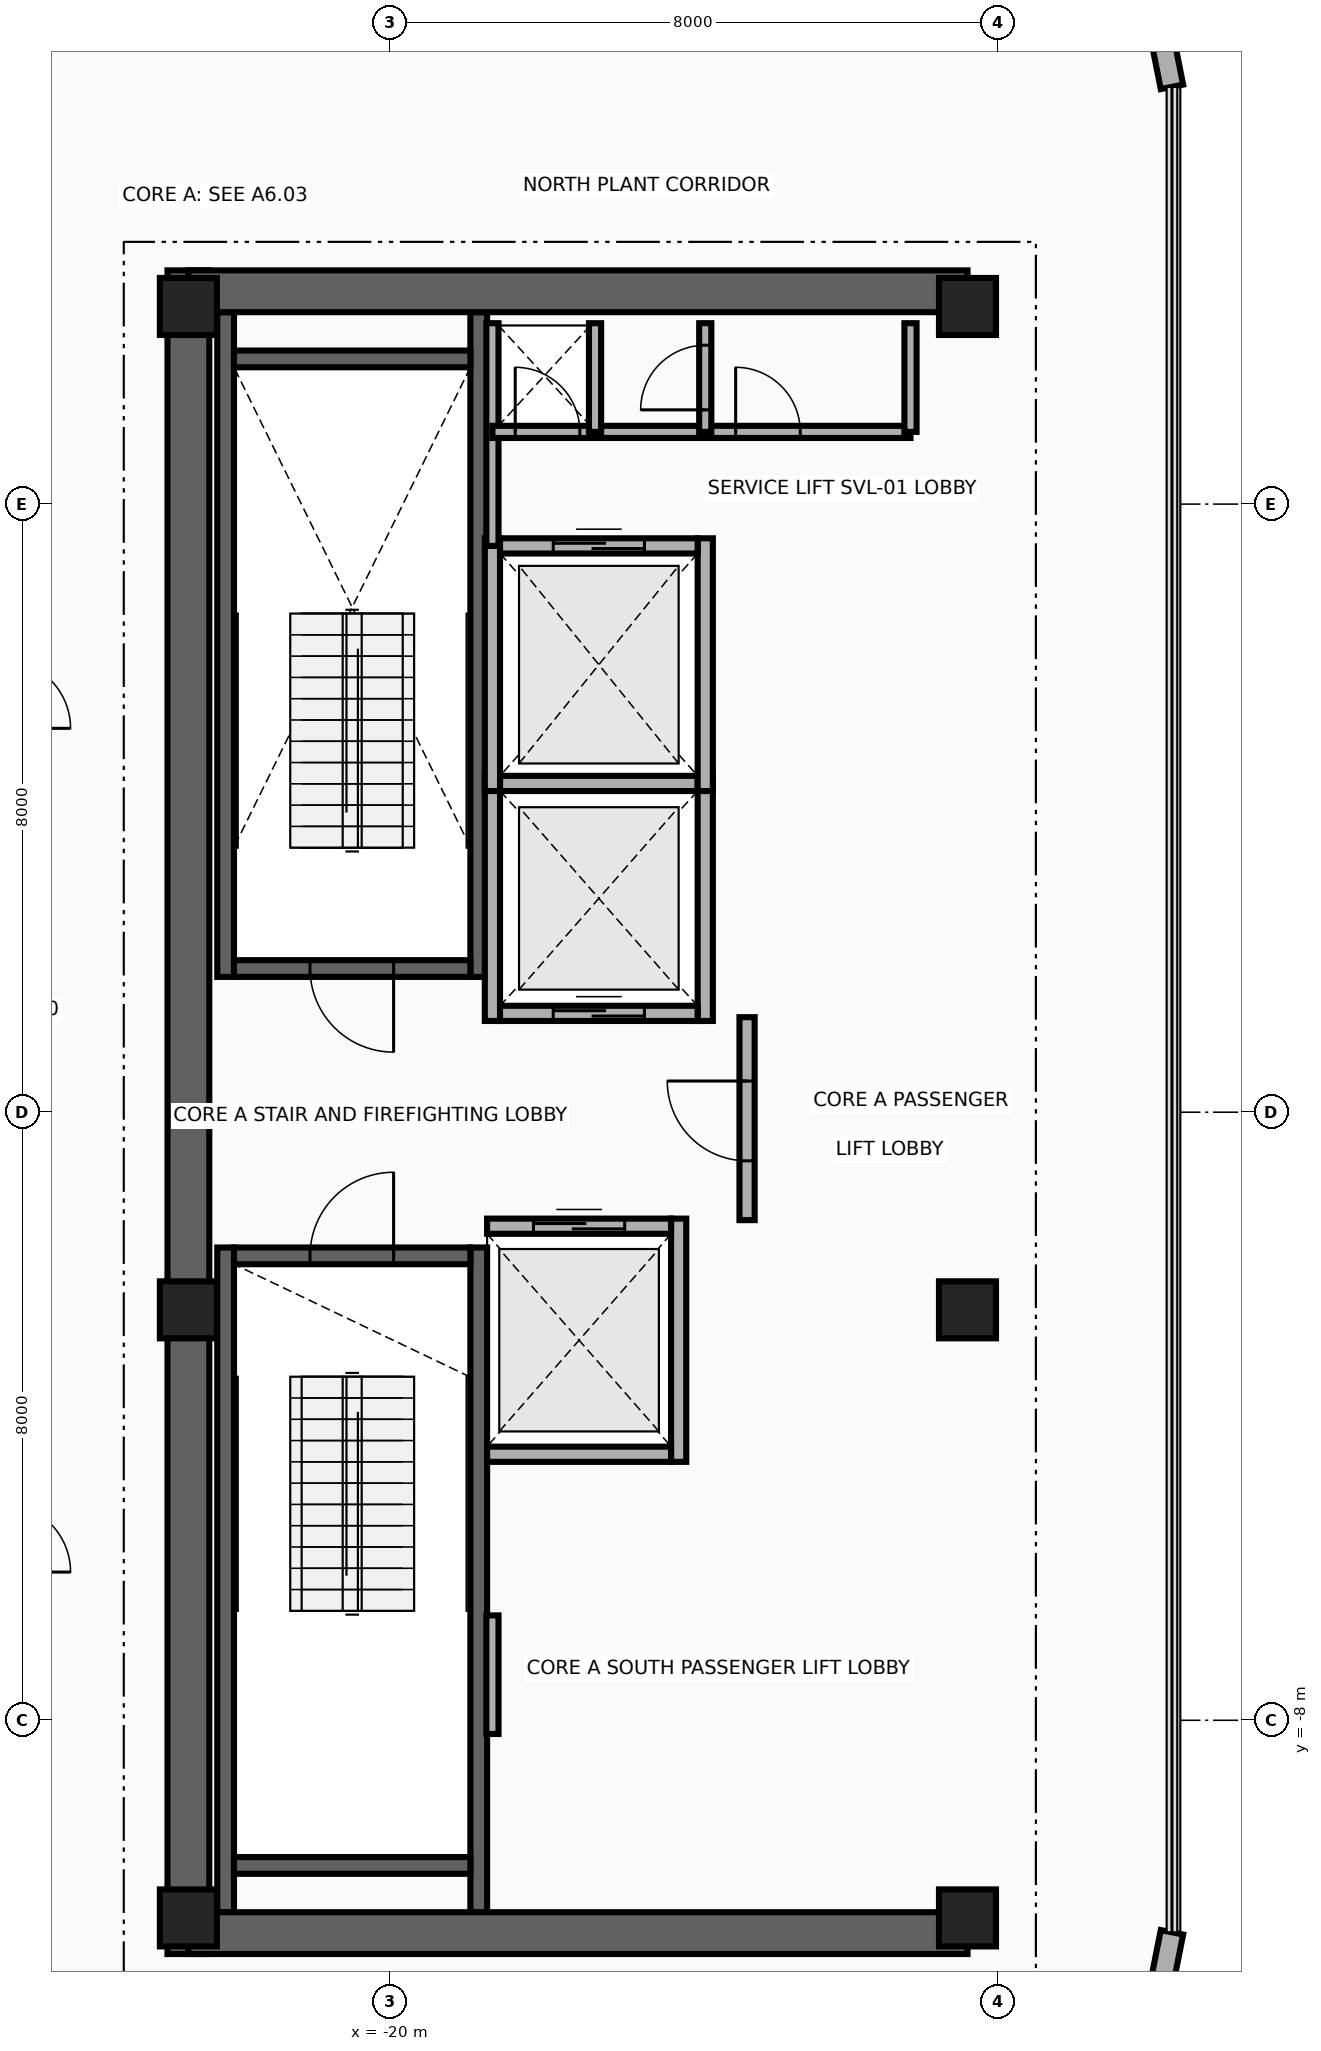
"""IFC4 building model, lengths in metres.
Left out: names, types, materials, properties, quantities, classifications, styles, units other than length and angle.
Written with IfcOpenShell. Run it as: python <this file> out.ifc"""

import sys

from ifc_helpers import new_model, si_unit, direction, frame, frame_2d, origin, origin_2d, place, context, subcontext, project, spatial, rectangle, extrude, source, transform, mapped, element, fill, save


model = new_model("IFC4")
c1 = context("Model", 3, precision=1e-05, world=origin(), true_north=direction((0.0, 1.0)))
c2 = subcontext(c1, "Body", "Model", "MODEL_VIEW")
j1 = project(units=[si_unit("LENGTHUNIT", "METRE"), si_unit("PLANEANGLEUNIT", "RADIAN")], contexts=[c1])
p1 = place(None, origin())
s1 = spatial("IfcSite", under=j1, at=p1, CompositionType="ELEMENT")
p2 = place(p1, origin())
s2 = spatial("IfcBuilding", under=s1, at=p2, CompositionType="ELEMENT")
p3 = place(p2, frame((0.0, 0.0, 299.4)))
s3 = spatial("IfcBuildingStorey", under=s2, at=p3, CompositionType="ELEMENT", Elevation=299.4)
for number, where, z_axis, x_axis in (
    (1, (-22.16, 1.78, 0.0), (0.0, 0.0, 1.0), (0.0, 1.0, 0.0)),
    (2, (-18.83, 1.78, 0.0), (0.0, 0.0, 1.0), (0.0, 1.0, 0.0)),
):
    element("IfcWall", number, at=place(p3, frame(where, z_axis=z_axis, x_axis=x_axis)), inside=s3, PredefinedType="SHEAR", context=c2, shape_type="SweptSolid", body=[
        extrude(rectangle(XDim=8.745, YDim=0.22, at=frame_2d((4.373, 0.0))), origin(), (0.0, 0.0, 1.0), 3.96),
    ])
p4 = place(p3, frame((-22.05, 1.89, 0.0), z_axis=(0.0, 0.0, 1.0), x_axis=(1.0, 0.0, 0.0)))
e3 = element("IfcWall", 3, at=p4, inside=s3, PredefinedType="SHEAR", context=c2, shape_type="SweptSolid", body=[
    extrude(rectangle(XDim=3.11, YDim=0.22, at=frame_2d((1.555, 0.0))), origin(), (0.0, 0.0, 1.0), 3.96),
])
p5 = place(p4, frame((1.0, 0.0, 0.0)))
e4 = element("IfcOpeningElement", 4, at=p5, cuts=e3, PredefinedType="OPENING", context=c2, shape_type="SweptSolid", body=[
    extrude(rectangle(XDim=1.1, YDim=2.15, at=frame_2d((0.55, 1.075))), frame((0.0, 0.125, 0.0), z_axis=(0.0, -1.0, 0.0), x_axis=(1.0, 0.0, 0.0)), (0.0, 0.0, 1.0), 0.25),
])
p6 = place(p3, frame((-22.05, 9.91, 0.0), z_axis=(0.0, 0.0, 1.0), x_axis=(1.0, 0.0, 0.0)))
e5 = element("IfcWall", 5, at=p6, inside=s3, PredefinedType="SHEAR", context=c2, shape_type="SweptSolid", body=[
    extrude(rectangle(XDim=3.11, YDim=0.22, at=frame_2d((1.555, 0.0))), origin(), (0.0, 0.0, 1.0), 3.96),
])
for number, where, z_axis, x_axis in (
    (6, (-22.16, -10.525, 0.0), (0.0, 0.0, 1.0), (0.0, 1.0, 0.0)),
    (7, (-18.83, -10.525, 0.0), (0.0, 0.0, 1.0), (0.0, 1.0, 0.0)),
):
    element("IfcWall", number, at=place(p3, frame(where, z_axis=z_axis, x_axis=x_axis)), inside=s3, PredefinedType="SHEAR", context=c2, shape_type="SweptSolid", body=[
        extrude(rectangle(XDim=8.745, YDim=0.22, at=frame_2d((4.373, 0.0))), origin(), (0.0, 0.0, 1.0), 3.96),
    ])
p7 = place(p3, frame((-22.05, -9.91, 0.0), z_axis=(0.0, 0.0, 1.0), x_axis=(1.0, 0.0, 0.0)))
e8 = element("IfcWall", 8, at=p7, inside=s3, PredefinedType="SHEAR", context=c2, shape_type="SweptSolid", body=[
    extrude(rectangle(XDim=3.11, YDim=0.22, at=frame_2d((1.555, 0.0))), origin(), (0.0, 0.0, 1.0), 3.96),
])
p8 = place(p3, frame((-22.05, -1.89, 0.0), z_axis=(0.0, 0.0, 1.0), x_axis=(1.0, 0.0, 0.0)))
e9 = element("IfcWall", 9, at=p8, inside=s3, PredefinedType="SHEAR", context=c2, shape_type="SweptSolid", body=[
    extrude(rectangle(XDim=3.11, YDim=0.22, at=frame_2d((1.555, 0.0))), origin(), (0.0, 0.0, 1.0), 3.96),
])
p9 = place(p8, frame((1.0, 0.0, 0.0)))
e10 = element("IfcOpeningElement", 10, at=p9, cuts=e9, PredefinedType="OPENING", context=c2, shape_type="SweptSolid", body=[
    extrude(rectangle(XDim=1.1, YDim=2.15, at=frame_2d((0.55, 1.075))), frame((0.0, 0.125, 0.0), z_axis=(0.0, -1.0, 0.0), x_axis=(1.0, 0.0, 0.0)), (0.0, 0.0, 1.0), 0.25),
])
p10 = place(p3, frame((-22.65, -11.075, 0.0), z_axis=(0.0, 0.0, 1.0), x_axis=(0.0, 1.0, 0.0)))
e11 = element("IfcWall", 11, at=p10, inside=s3, PredefinedType="SHEAR", context=c2, shape_type="SweptSolid", body=[
    extrude(rectangle(XDim=22.15, YDim=0.55, at=frame_2d((11.075, 0.0))), origin(), (0.0, 0.0, 1.0), 3.96),
])
for number, where, z_axis, x_axis in (
    (12, (-22.65, 10.8, 0.0), (0.0, 0.0, 1.0), (1.0, 0.0, 0.0)),
    (13, (-22.65, -10.8, 0.0), (0.0, 0.0, 1.0), (1.0, 0.0, 0.0)),
):
    element("IfcWall", number, at=place(p3, frame(where, z_axis=z_axis, x_axis=x_axis)), inside=s3, PredefinedType="SHEAR", context=c2, shape_type="SweptSolid", body=[
        extrude(rectangle(XDim=10.25, YDim=0.55, at=frame_2d((5.125, 0.0))), origin(), (0.0, 0.0, 1.0), 3.96),
    ])
m1 = source(origin(), c2, "Body", "SweptSolid", [
    extrude(rectangle(XDim=0.75, YDim=0.75, at=origin_2d()), origin(), (0.0, 0.0, 1.0), 4.2),
])
for number, where, z_axis, x_axis in (
    (14, (-22.65, -10.6, 0.0), (0.0, 0.0, 1.0), (1.0, 0.0, 0.0)),
    (15, (-12.4, -10.6, 0.0), (0.0, 0.0, 1.0), (1.0, 0.0, 0.0)),
    (16, (-22.65, -2.6, 0.0), (0.0, 0.0, 1.0), (1.0, 0.0, 0.0)),
    (17, (-12.4, -2.6, 0.0), (0.0, 0.0, 1.0), (1.0, 0.0, 0.0)),
    (18, (-22.65, 10.6, 0.0), (0.0, 0.0, 1.0), (1.0, 0.0, 0.0)),
    (19, (-12.4, 10.6, 0.0), (0.0, 0.0, 1.0), (1.0, 0.0, 0.0)),
):
    element("IfcColumn", number, at=place(p3, frame(where, z_axis=z_axis, x_axis=x_axis)), inside=s3, PredefinedType="COLUMN", context=c2, shape_type="MappedRepresentation", body=[
        mapped(m1, transform((0.0, 0.0, 0.0), x_axis=(1.0, 0.0, 0.0), y_axis=(0.0, 1.0, 0.0), z_axis=(0.0, 0.0, 1.0), scale=1.0)),
    ])
for number, where, z_axis, x_axis in (
    (20, (-9.932, 14.605, 0.0), (0.0, 0.0, 1.0), (0.195, -0.981, 0.0)),
    (21, (-9.71, -10.789, 0.0), (0.0, 0.0, 1.0), (-0.195, -0.981, 0.0)),
):
    element("IfcWall", number, at=place(p3, frame(where, z_axis=z_axis, x_axis=x_axis)), inside=s3, PredefinedType="SOLIDWALL", context=c2, shape_type="SweptSolid", body=[
        extrude(rectangle(XDim=1.138, YDim=0.3, at=frame_2d((0.569, 0.0))), origin(), (0.0, 0.0, 1.0), 3.96),
    ])
for number, where, z_axis, x_axis in (
    (22, (-18.65, 1.2, 0.0), (0.0, 0.0, 1.0), (0.0, 1.0, 0.0)),
    (23, (-15.85, 1.2, 0.0), (0.0, 0.0, 1.0), (0.0, 1.0, 0.0)),
):
    element("IfcWall", number, at=place(p3, frame(where, z_axis=z_axis, x_axis=x_axis)), inside=s3, PredefinedType="MOVABLE", context=c2, shape_type="SweptSolid", body=[
        extrude(rectangle(XDim=3.225, YDim=0.2, at=frame_2d((1.613, 0.0))), origin(), (0.0, 0.0, 1.0), 3.96),
    ])
p11 = place(p3, frame((-18.55, 1.3, 0.0), z_axis=(0.0, 0.0, 1.0), x_axis=(1.0, 0.0, 0.0)))
e24 = element("IfcWall", 24, at=p11, inside=s3, PredefinedType="MOVABLE", context=c2, shape_type="SweptSolid", body=[
    extrude(rectangle(XDim=2.6, YDim=0.2, at=frame_2d((1.3, 0.0))), origin(), (0.0, 0.0, 1.0), 3.96),
])
p12 = place(p11, frame((0.7, 0.0, 0.0)))
e25 = element("IfcOpeningElement", 25, at=p12, cuts=e24, PredefinedType="OPENING", context=c2, shape_type="SweptSolid", body=[
    extrude(rectangle(XDim=1.2, YDim=2.1, at=frame_2d((0.6, 1.05))), frame((0.0, 0.115, 0.0), z_axis=(0.0, -1.0, 0.0), x_axis=(1.0, 0.0, 0.0)), (0.0, 0.0, 1.0), 0.23),
])
p13 = place(p3, frame((-18.55, 4.325, 0.0), z_axis=(0.0, 0.0, 1.0), x_axis=(1.0, 0.0, 0.0)))
e26 = element("IfcWall", 26, at=p13, inside=s3, PredefinedType="MOVABLE", context=c2, shape_type="SweptSolid", body=[
    extrude(rectangle(XDim=2.6, YDim=0.2, at=frame_2d((1.3, 0.0))), origin(), (0.0, 0.0, 1.0), 3.96),
])
p14 = place(p3, frame((-16.2, -4.6, 0.0), z_axis=(0.0, 0.0, 1.0), x_axis=(0.0, 1.0, 0.0)))
e27 = element("IfcWall", 27, at=p14, inside=s3, PredefinedType="MOVABLE", context=c2, shape_type="SweptSolid", body=[
    extrude(rectangle(XDim=3.2, YDim=0.2, at=frame_2d((1.6, 0.0))), origin(), (0.0, 0.0, 1.0), 3.96),
])
p15 = place(p3, frame((-18.72, -4.5, 0.0), z_axis=(0.0, 0.0, 1.0), x_axis=(1.0, 0.0, 0.0)))
e28 = element("IfcWall", 28, at=p15, inside=s3, PredefinedType="MOVABLE", context=c2, shape_type="SweptSolid", body=[
    extrude(rectangle(XDim=2.42, YDim=0.2, at=frame_2d((1.21, 0.0))), origin(), (0.0, 0.0, 1.0), 3.96),
])
p16 = place(p3, frame((-18.72, -1.5, 0.0), z_axis=(0.0, 0.0, 1.0), x_axis=(1.0, 0.0, 0.0)))
e29 = element("IfcWall", 29, at=p16, inside=s3, PredefinedType="MOVABLE", context=c2, shape_type="SweptSolid", body=[
    extrude(rectangle(XDim=2.42, YDim=0.2, at=frame_2d((1.21, 0.0))), origin(), (0.0, 0.0, 1.0), 3.96),
])
p17 = place(p16, frame((0.61, 0.0, 0.0)))
e30 = element("IfcOpeningElement", 30, at=p17, cuts=e29, PredefinedType="OPENING", context=c2, shape_type="SweptSolid", body=[
    extrude(rectangle(XDim=1.2, YDim=2.1, at=frame_2d((0.6, 1.05))), frame((0.0, 0.115, 0.0), z_axis=(0.0, -1.0, 0.0), x_axis=(1.0, 0.0, 0.0)), (0.0, 0.0, 1.0), 0.23),
])
for number, where, z_axis, x_axis in (
    (31, (-18.65, 4.225, 0.0), (0.0, 0.0, 1.0), (0.0, 1.0, 0.0)),
    (32, (-15.85, 4.225, 0.0), (0.0, 0.0, 1.0), (0.0, 1.0, 0.0)),
):
    element("IfcWall", number, at=place(p3, frame(where, z_axis=z_axis, x_axis=x_axis)), inside=s3, PredefinedType="MOVABLE", context=c2, shape_type="SweptSolid", body=[
        extrude(rectangle(XDim=3.325, YDim=0.2, at=frame_2d((1.663, 0.0))), origin(), (0.0, 0.0, 1.0), 3.96),
    ])
p18 = place(p3, frame((-18.55, 7.45, 0.0), z_axis=(0.0, 0.0, 1.0), x_axis=(1.0, 0.0, 0.0)))
e33 = element("IfcWall", 33, at=p18, inside=s3, PredefinedType="MOVABLE", context=c2, shape_type="SweptSolid", body=[
    extrude(rectangle(XDim=2.6, YDim=0.2, at=frame_2d((1.3, 0.0))), origin(), (0.0, 0.0, 1.0), 3.96),
])
p19 = place(p18, frame((0.7, 0.0, 0.0)))
e34 = element("IfcOpeningElement", 34, at=p19, cuts=e33, PredefinedType="OPENING", context=c2, shape_type="SweptSolid", body=[
    extrude(rectangle(XDim=1.2, YDim=2.1, at=frame_2d((0.6, 1.05))), frame((0.0, 0.115, 0.0), z_axis=(0.0, -1.0, 0.0), x_axis=(1.0, 0.0, 0.0)), (0.0, 0.0, 1.0), 0.23),
])
p20 = place(p3, frame((-15.3, -1.42, 0.0), z_axis=(0.0, 0.0, 1.0), x_axis=(0.0, 1.0, 0.0)))
e35 = element("IfcWall", 35, at=p20, inside=s3, PredefinedType="PARTITIONING", context=c2, shape_type="SweptSolid", body=[
    extrude(rectangle(XDim=2.67, YDim=0.2, at=frame_2d((1.335, 0.0))), origin(), (0.0, 0.0, 1.0), 3.96),
])
p21 = place(p20, frame((0.78, 0.0, 0.0)))
e36 = element("IfcOpeningElement", 36, at=p21, cuts=e35, PredefinedType="OPENING", context=c2, shape_type="SweptSolid", body=[
    extrude(rectangle(XDim=1.05, YDim=2.15, at=frame_2d((0.525, 1.075))), frame((0.0, 0.115, 0.0), z_axis=(0.0, -1.0, 0.0), x_axis=(1.0, 0.0, 0.0)), (0.0, 0.0, 1.0), 0.23),
])
p22 = place(p3, frame((-18.65, 7.45, 0.0), z_axis=(0.0, 0.0, 1.0), x_axis=(0.0, 1.0, 0.0)))
e37 = element("IfcWall", 37, at=p22, inside=s3, PredefinedType="PARTITIONING", context=c2, shape_type="SweptSolid", body=[
    extrude(rectangle(XDim=2.93, YDim=0.16, at=frame_2d((1.465, 0.0))), origin(), (0.0, 0.0, 1.0), 3.96),
])
p23 = place(p3, frame((-18.65, -8.18, 0.0), z_axis=(0.0, 0.0, 1.0), x_axis=(0.0, 1.0, 0.0)))
e38 = element("IfcWall", 38, at=p23, inside=s3, PredefinedType="PARTITIONING", context=c2, shape_type="SweptSolid", body=[
    extrude(rectangle(XDim=1.56, YDim=0.16, at=frame_2d((0.78, 0.0))), origin(), (0.0, 0.0, 1.0), 3.96),
])
p24 = place(p3, frame((-18.65, 8.95, 0.0), z_axis=(0.0, 0.0, 1.0), x_axis=(1.0, 0.0, 0.0)))
e39 = element("IfcWall", 39, at=p24, inside=s3, PredefinedType="PARTITIONING", context=c2, shape_type="SweptSolid", body=[
    extrude(rectangle(XDim=5.5, YDim=0.16, at=frame_2d((2.75, 0.0))), origin(), (0.0, 0.0, 1.0), 3.96),
])
p25 = place(p24, frame((0.3, 0.0, 0.0)))
e40 = element("IfcOpeningElement", 40, at=p25, cuts=e39, PredefinedType="OPENING", context=c2, shape_type="SweptSolid", body=[
    extrude(rectangle(XDim=0.85, YDim=2.05, at=frame_2d((0.425, 1.025))), frame((0.0, 0.095, 0.0), z_axis=(0.0, -1.0, 0.0), x_axis=(1.0, 0.0, 0.0)), (0.0, 0.0, 1.0), 0.19),
])
p26 = place(p24, frame((3.2, 0.0, 0.0)))
e41 = element("IfcOpeningElement", 41, at=p26, cuts=e39, PredefinedType="OPENING", context=c2, shape_type="SweptSolid", body=[
    extrude(rectangle(XDim=0.85, YDim=2.05, at=frame_2d((0.425, 1.025))), frame((0.0, 0.095, 0.0), z_axis=(0.0, -1.0, 0.0), x_axis=(1.0, 0.0, 0.0)), (0.0, 0.0, 1.0), 0.19),
])
for number, where, z_axis, x_axis in (
    (42, (-13.15, 8.95, 0.0), (0.0, 0.0, 1.0), (0.0, 1.0, 0.0)),
    (43, (-17.3, 8.95, 0.0), (0.0, 0.0, 1.0), (0.0, 1.0, 0.0)),
):
    element("IfcWall", number, at=place(p3, frame(where, z_axis=z_axis, x_axis=x_axis)), inside=s3, PredefinedType="PARTITIONING", context=c2, shape_type="SweptSolid", body=[
        extrude(rectangle(XDim=1.43, YDim=0.16, at=frame_2d((0.715, 0.0))), origin(), (0.0, 0.0, 1.0), 3.96),
    ])
p27 = place(p3, frame((-15.85, 8.95, 0.0), z_axis=(0.0, 0.0, 1.0), x_axis=(0.0, 1.0, 0.0)))
e44 = element("IfcWall", 44, at=p27, inside=s3, PredefinedType="PARTITIONING", context=c2, shape_type="SweptSolid", body=[
    extrude(rectangle(XDim=1.43, YDim=0.16, at=frame_2d((0.715, 0.0))), origin(), (0.0, 0.0, 1.0), 3.96),
])
p28 = place(p27, frame((0.29, 0.0, 0.0)))
e45 = element("IfcOpeningElement", 45, at=p28, cuts=e44, PredefinedType="OPENING", context=c2, shape_type="SweptSolid", body=[
    extrude(rectangle(XDim=0.85, YDim=2.05, at=frame_2d((0.425, 1.025))), frame((0.0, 0.095, 0.0), z_axis=(0.0, -1.0, 0.0), x_axis=(1.0, 0.0, 0.0)), (0.0, 0.0, 1.0), 0.19),
])
p29 = place(p12, origin())
e46 = element("IfcDoor", 46, at=p29, inside=s3, OperationType="DOUBLE_DOOR_SLIDING", PredefinedType="DOOR", context=c2, shape_type="SweptSolid", body=[
    extrude(rectangle(XDim=1.2, YDim=2.1, at=frame_2d((0.6, 1.05))), frame((0.0, 0.025, 0.0), z_axis=(0.0, -1.0, 0.0), x_axis=(1.0, 0.0, 0.0)), (0.0, 0.0, 1.0), 0.05),
])
fill(e25, e46)
p30 = place(p17, origin())
e47 = element("IfcDoor", 47, at=p30, inside=s3, OperationType="DOUBLE_DOOR_SLIDING", PredefinedType="DOOR", context=c2, shape_type="SweptSolid", body=[
    extrude(rectangle(XDim=1.2, YDim=2.1, at=frame_2d((0.6, 1.05))), frame((0.0, 0.025, 0.0), z_axis=(0.0, -1.0, 0.0), x_axis=(1.0, 0.0, 0.0)), (0.0, 0.0, 1.0), 0.05),
])
fill(e30, e47)
p31 = place(p19, origin())
e48 = element("IfcDoor", 48, at=p31, inside=s3, OperationType="DOUBLE_DOOR_SLIDING", PredefinedType="DOOR", context=c2, shape_type="SweptSolid", body=[
    extrude(rectangle(XDim=1.2, YDim=2.1, at=frame_2d((0.6, 1.05))), frame((0.0, 0.025, 0.0), z_axis=(0.0, -1.0, 0.0), x_axis=(1.0, 0.0, 0.0)), (0.0, 0.0, 1.0), 0.05),
])
fill(e34, e48)
p32 = place(p21, origin())
e49 = element("IfcDoor", 49, at=p32, inside=s3, OperationType="SINGLE_SWING_RIGHT", PredefinedType="DOOR", context=c2, shape_type="SweptSolid", body=[
    extrude(rectangle(XDim=1.05, YDim=2.15, at=frame_2d((0.525, 1.075))), frame((0.0, 0.025, 0.0), z_axis=(0.0, -1.0, 0.0), x_axis=(1.0, 0.0, 0.0)), (0.0, 0.0, 1.0), 0.05),
])
fill(e36, e49)
p33 = place(p5, frame((1.1, 0.0, 0.0), z_axis=(0.0, 0.0, 1.0), x_axis=(-1.0, 0.0, 0.0)))
e50 = element("IfcDoor", 50, at=p33, inside=s3, OperationType="SINGLE_SWING_LEFT", PredefinedType="DOOR", context=c2, shape_type="SweptSolid", body=[
    extrude(rectangle(XDim=1.1, YDim=2.15, at=frame_2d((0.55, 1.075))), frame((0.0, 0.025, 0.0), z_axis=(0.0, -1.0, 0.0), x_axis=(1.0, 0.0, 0.0)), (0.0, 0.0, 1.0), 0.05),
])
fill(e4, e50)
p34 = place(p9, origin())
e51 = element("IfcDoor", 51, at=p34, inside=s3, OperationType="SINGLE_SWING_RIGHT", PredefinedType="DOOR", context=c2, shape_type="SweptSolid", body=[
    extrude(rectangle(XDim=1.1, YDim=2.15, at=frame_2d((0.55, 1.075))), frame((0.0, 0.025, 0.0), z_axis=(0.0, -1.0, 0.0), x_axis=(1.0, 0.0, 0.0)), (0.0, 0.0, 1.0), 0.05),
])
fill(e10, e51)
p35 = place(p25, origin())
e52 = element("IfcDoor", 52, at=p35, inside=s3, OperationType="SINGLE_SWING_LEFT", PredefinedType="DOOR", context=c2, shape_type="SweptSolid", body=[
    extrude(rectangle(XDim=0.85, YDim=2.05, at=frame_2d((0.425, 1.025))), frame((0.0, 0.025, 0.0), z_axis=(0.0, -1.0, 0.0), x_axis=(1.0, 0.0, 0.0)), (0.0, 0.0, 1.0), 0.05),
])
fill(e40, e52)
p36 = place(p26, origin())
e53 = element("IfcDoor", 53, at=p36, inside=s3, OperationType="SINGLE_SWING_RIGHT", PredefinedType="DOOR", context=c2, shape_type="SweptSolid", body=[
    extrude(rectangle(XDim=0.85, YDim=2.05, at=frame_2d((0.425, 1.025))), frame((0.0, 0.025, 0.0), z_axis=(0.0, -1.0, 0.0), x_axis=(1.0, 0.0, 0.0)), (0.0, 0.0, 1.0), 0.05),
])
fill(e41, e53)
p37 = place(p28, origin())
e54 = element("IfcDoor", 54, at=p37, inside=s3, OperationType="SINGLE_SWING_LEFT", PredefinedType="DOOR", context=c2, shape_type="SweptSolid", body=[
    extrude(rectangle(XDim=0.85, YDim=2.05, at=frame_2d((0.425, 1.025))), frame((0.0, 0.025, 0.0), z_axis=(0.0, -1.0, 0.0), x_axis=(1.0, 0.0, 0.0)), (0.0, 0.0, 1.0), 0.05),
])
fill(e45, e54)
save(model, sys.argv[1])
